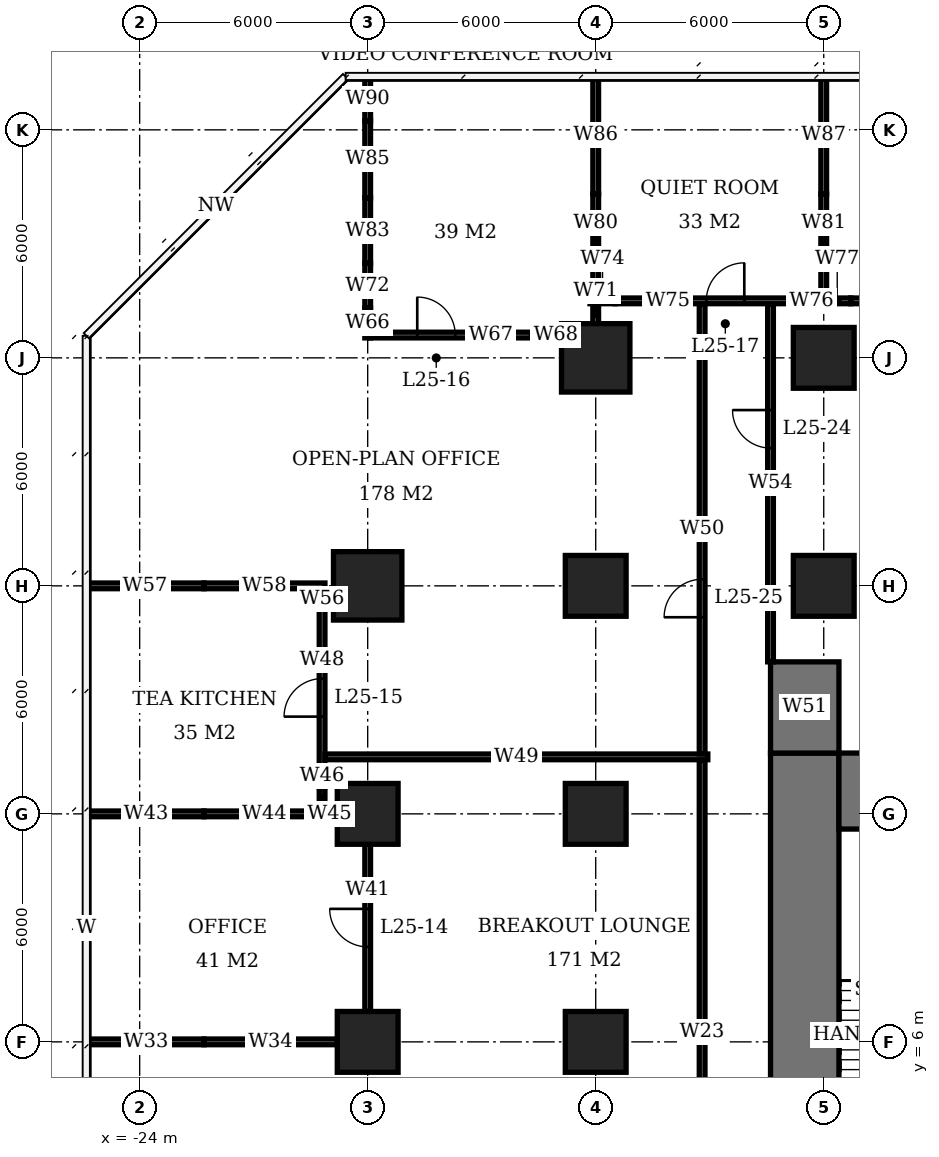
"""IFC4 building model, lengths in metres.
Left out: names, types, materials, properties, quantities, classifications, styles, units other than length and angle.
Written with IfcOpenShell. Run it as: python <this file> out.ifc"""

import sys

from ifc_helpers import new_model, si_unit, direction, frame, frame_2d, origin, origin_2d, place, context, subcontext, project, spatial, rectangle, extrude, element, fill, save


model = new_model("IFC4")
c1 = context("Model", 3, precision=1e-05, world=origin(), true_north=direction((0.0, 1.0)))
c2 = subcontext(c1, "Body", "Model", "MODEL_VIEW")
j1 = project(units=[si_unit("LENGTHUNIT", "METRE"), si_unit("PLANEANGLEUNIT", "RADIAN")], contexts=[c1])
p1 = place(None, origin())
s1 = spatial("IfcSite", under=j1, at=p1, CompositionType="ELEMENT")
p2 = place(p1, origin())
s2 = spatial("IfcBuilding", under=s1, at=p2, CompositionType="ELEMENT")
p3 = place(p2, frame((0.0, 0.0, 105.5)))
s3 = spatial("IfcBuildingStorey", under=s2, at=p3, CompositionType="ELEMENT", Elevation=105.5)
for number, where, z_axis, x_axis in (
    (1, (-18.0, 6.0, 0.0), (0.0, 0.0, 1.0), (1.0, 0.0, 0.0)),
    (2, (-18.0, 12.0, 0.0), (0.0, 0.0, 1.0), (1.0, 0.0, 0.0)),
):
    element("IfcColumn", number, at=place(p3, frame(where, z_axis=z_axis, x_axis=x_axis)), inside=s3, PredefinedType="COLUMN", context=c2, shape_type="SweptSolid", body=[
        extrude(rectangle(XDim=1.6, YDim=1.6, at=origin_2d()), origin(), (0.0, 0.0, 1.0), 3.9),
    ])
p4 = place(p3, frame((-18.0, 18.0, 0.0), z_axis=(0.0, 0.0, 1.0), x_axis=(1.0, 0.0, 0.0)))
e3 = element("IfcColumn", 3, at=p4, inside=s3, PredefinedType="COLUMN", context=c2, shape_type="SweptSolid", body=[
    extrude(rectangle(XDim=1.8, YDim=1.8, at=origin_2d()), origin(), (0.0, 0.0, 1.0), 3.9),
])
for number, where, z_axis, x_axis in (
    (4, (-12.0, 6.0, 0.0), (0.0, 0.0, 1.0), (1.0, 0.0, 0.0)),
    (5, (-12.0, 12.0, 0.0), (0.0, 0.0, 1.0), (1.0, 0.0, 0.0)),
    (6, (-12.0, 18.0, 0.0), (0.0, 0.0, 1.0), (1.0, 0.0, 0.0)),
):
    element("IfcColumn", number, at=place(p3, frame(where, z_axis=z_axis, x_axis=x_axis)), inside=s3, PredefinedType="COLUMN", context=c2, shape_type="SweptSolid", body=[
        extrude(rectangle(XDim=1.6, YDim=1.6, at=origin_2d()), origin(), (0.0, 0.0, 1.0), 3.9),
    ])
p5 = place(p3, frame((-12.0, 24.0, 0.0), z_axis=(0.0, 0.0, 1.0), x_axis=(1.0, 0.0, 0.0)))
e7 = element("IfcColumn", 7, at=p5, inside=s3, PredefinedType="COLUMN", context=c2, shape_type="SweptSolid", body=[
    extrude(rectangle(XDim=1.8, YDim=1.8, at=origin_2d()), origin(), (0.0, 0.0, 1.0), 3.9),
])
for number, where, z_axis, x_axis in (
    (8, (-6.0, 18.0, 0.0), (0.0, 0.0, 1.0), (1.0, 0.0, 0.0)),
    (9, (-6.0, 24.0, 0.0), (0.0, 0.0, 1.0), (1.0, 0.0, 0.0)),
):
    element("IfcColumn", number, at=place(p3, frame(where, z_axis=z_axis, x_axis=x_axis)), inside=s3, PredefinedType="COLUMN", context=c2, shape_type="SweptSolid", body=[
        extrude(rectangle(XDim=1.6, YDim=1.6, at=origin_2d()), origin(), (0.0, 0.0, 1.0), 3.9),
    ])
p6 = place(p3, frame((-5.6, 12.6, 0.0), z_axis=(0.0, 0.0, 1.0), x_axis=(1.0, 0.0, 0.0)))
e10 = element("IfcWall", 10, at=p6, inside=s3, PredefinedType="SHEAR", context=c2, shape_type="SweptSolid", body=[
    extrude(rectangle(XDim=23.2, YDim=2.0, at=frame_2d((11.6, 0.0))), origin(), (0.0, 0.0, 1.0), 3.9),
])
p7 = place(p3, frame((-6.5, -7.6, 0.0), z_axis=(0.0, 0.0, 1.0), x_axis=(0.0, 1.0, 0.0)))
e11 = element("IfcWall", 11, at=p7, inside=s3, PredefinedType="SHEAR", context=c2, shape_type="SweptSolid", body=[
    extrude(rectangle(XDim=21.2, YDim=1.8, at=frame_2d((10.6, 0.0))), origin(), (0.0, 0.0, 1.0), 3.9),
])
p8 = place(p7, frame((7.8, 0.0, 0.0)))
e12 = element("IfcOpeningElement", 12, at=p8, cuts=e11, PredefinedType="OPENING", context=c2, shape_type="SweptSolid", body=[
    extrude(rectangle(XDim=1.8, YDim=2.4, at=frame_2d((0.9, 1.2))), frame((0.0, 0.91, 0.0), z_axis=(0.0, -1.0, 0.0), x_axis=(1.0, 0.0, 0.0)), (0.0, 0.0, 1.0), 1.82),
])
p9 = place(p3, frame((-6.5, 13.6, 0.0), z_axis=(0.0, 0.0, 1.0), x_axis=(0.0, 1.0, 0.0)))
e13 = element("IfcWall", 13, at=p9, inside=s3, PredefinedType="SHEAR", context=c2, shape_type="SweptSolid", body=[
    extrude(rectangle(XDim=2.4, YDim=1.8, at=frame_2d((1.2, 0.0))), origin(), (0.0, 0.0, 1.0), 3.9),
])
p10 = place(p3, frame((-25.35, 6.0, 0.0), z_axis=(0.0, 0.0, 1.0), x_axis=(1.0, 0.0, 0.0)))
e14 = element("IfcWall", 14, at=p10, inside=s3, PredefinedType="PARTITIONING", context=c2, shape_type="SweptSolid", body=[
    extrude(rectangle(XDim=3.04, YDim=0.15, at=frame_2d((1.52, 0.0))), origin(), (0.0, 0.0, 1.0), 3.65),
])
p11 = place(p3, frame((-22.31, 6.0, 0.0), z_axis=(0.0, 0.0, 1.0), x_axis=(1.0, 0.0, 0.0)))
e15 = element("IfcWall", 15, at=p11, inside=s3, PredefinedType="PARTITIONING", context=c2, shape_type="SweptSolid", body=[
    extrude(rectangle(XDim=3.51, YDim=0.15, at=frame_2d((1.755, 0.0))), origin(), (0.0, 0.0, 1.0), 2.65),
])
p12 = place(p3, frame((-25.35, 12.0, 0.0), z_axis=(0.0, 0.0, 1.0), x_axis=(1.0, 0.0, 0.0)))
e16 = element("IfcWall", 16, at=p12, inside=s3, PredefinedType="PARTITIONING", context=c2, shape_type="SweptSolid", body=[
    extrude(rectangle(XDim=3.04, YDim=0.15, at=frame_2d((1.52, 0.0))), origin(), (0.0, 0.0, 1.0), 3.65),
])
p13 = place(p3, frame((-22.31, 12.0, 0.0), z_axis=(0.0, 0.0, 1.0), x_axis=(1.0, 0.0, 0.0)))
e17 = element("IfcWall", 17, at=p13, inside=s3, PredefinedType="PARTITIONING", context=c2, shape_type="SweptSolid", body=[
    extrude(rectangle(XDim=3.185, YDim=0.15, at=frame_2d((1.593, 0.0))), origin(), (0.0, 0.0, 1.0), 2.65),
])
p14 = place(p3, frame((-19.2, 12.0, 0.0), z_axis=(0.0, 0.0, 1.0), x_axis=(1.0, 0.0, 0.0)))
e18 = element("IfcWall", 18, at=p14, inside=s3, PredefinedType="PARTITIONING", context=c2, shape_type="SweptSolid", body=[
    extrude(rectangle(XDim=0.4, YDim=0.15, at=frame_2d((0.2, 0.0))), origin(), (0.0, 0.0, 1.0), 2.65),
])
p15 = place(p3, frame((-25.4, 18.0, 0.0), z_axis=(0.0, 0.0, 1.0), x_axis=(1.0, 0.0, 0.0)))
e19 = element("IfcWall", 19, at=p15, inside=s3, PredefinedType="PARTITIONING", context=c2, shape_type="SweptSolid", body=[
    extrude(rectangle(XDim=3.09, YDim=0.15, at=frame_2d((1.545, 0.0))), origin(), (0.0, 0.0, 1.0), 3.65),
])
p16 = place(p3, frame((-22.31, 18.0, 0.0), z_axis=(0.0, 0.0, 1.0), x_axis=(1.0, 0.0, 0.0)))
e20 = element("IfcWall", 20, at=p16, inside=s3, PredefinedType="PARTITIONING", context=c2, shape_type="SweptSolid", body=[
    extrude(rectangle(XDim=3.185, YDim=0.15, at=frame_2d((1.593, 0.0))), origin(), (0.0, 0.0, 1.0), 2.65),
])
p17 = place(p3, frame((-17.925, 24.6, 0.0), z_axis=(0.0, 0.0, 1.0), x_axis=(1.0, 0.0, 0.0)))
e21 = element("IfcWall", 21, at=p17, inside=s3, PredefinedType="PARTITIONING", context=c2, shape_type="SweptSolid", body=[
    extrude(rectangle(XDim=3.533, YDim=0.15, at=frame_2d((1.767, 0.0))), origin(), (0.0, 0.0, 1.0), 3.65),
])
p18 = place(p17, frame((1.229, 0.0, 0.0)))
e22 = element("IfcOpeningElement", 22, at=p18, cuts=e21, PredefinedType="OPENING", context=c2, shape_type="SweptSolid", body=[
    extrude(rectangle(XDim=1.0, YDim=2.1, at=frame_2d((0.5, 1.05))), frame((0.0, 0.085, 0.0), z_axis=(0.0, -1.0, 0.0), x_axis=(1.0, 0.0, 0.0)), (0.0, 0.0, 1.0), 0.17),
])
p19 = place(p3, frame((-14.392, 24.6, 0.0), z_axis=(0.0, 0.0, 1.0), x_axis=(1.0, 0.0, 0.0)))
e23 = element("IfcWall", 23, at=p19, inside=s3, PredefinedType="PARTITIONING", context=c2, shape_type="SweptSolid", body=[
    extrude(rectangle(XDim=1.492, YDim=0.15, at=frame_2d((0.746, 0.0))), origin(), (0.0, 0.0, 1.0), 2.65),
])
p20 = place(p3, frame((-12.15, 25.5, 0.0), z_axis=(0.0, 0.0, 1.0), x_axis=(1.0, 0.0, 0.0)))
e24 = element("IfcWall", 24, at=p20, inside=s3, PredefinedType="PARTITIONING", context=c2, shape_type="SweptSolid", body=[
    extrude(rectangle(XDim=0.66, YDim=0.15, at=frame_2d((0.33, 0.0))), origin(), (0.0, 0.0, 1.0), 2.65),
])
p21 = place(p3, frame((-11.49, 25.5, 0.0), z_axis=(0.0, 0.0, 1.0), x_axis=(1.0, 0.0, 0.0)))
e25 = element("IfcWall", 25, at=p21, inside=s3, PredefinedType="PARTITIONING", context=c2, shape_type="SweptSolid", body=[
    extrude(rectangle(XDim=4.78, YDim=0.15, at=frame_2d((2.39, 0.0))), origin(), (0.0, 0.0, 1.0), 3.65),
])
p22 = place(p21, frame((2.4, 0.0, 0.0)))
e26 = element("IfcOpeningElement", 26, at=p22, cuts=e25, PredefinedType="OPENING", context=c2, shape_type="SweptSolid", body=[
    extrude(rectangle(XDim=1.0, YDim=2.1, at=frame_2d((0.5, 1.05))), frame((0.0, 0.085, 0.0), z_axis=(0.0, -1.0, 0.0), x_axis=(1.0, 0.0, 0.0)), (0.0, 0.0, 1.0), 0.17),
])
p23 = place(p3, frame((-6.71, 25.5, 0.0), z_axis=(0.0, 0.0, 1.0), x_axis=(1.0, 0.0, 0.0)))
e27 = element("IfcWall", 27, at=p23, inside=s3, PredefinedType="PARTITIONING", context=c2, shape_type="SweptSolid", body=[
    extrude(rectangle(XDim=0.785, YDim=0.15, at=frame_2d((0.393, 0.0))), origin(), (0.0, 0.0, 1.0), 2.65),
])
p24 = place(p3, frame((-6.0, 25.5, 0.0), z_axis=(0.0, 0.0, 1.0), x_axis=(1.0, 0.0, 0.0)))
e28 = element("IfcWall", 28, at=p24, inside=s3, PredefinedType="PARTITIONING", context=c2, shape_type="SweptSolid", body=[
    extrude(rectangle(XDim=0.71, YDim=0.15, at=frame_2d((0.355, 0.0))), origin(), (0.0, 0.0, 1.0), 2.65),
])
p25 = place(p3, frame((-5.29, 25.5, 0.0), z_axis=(0.0, 0.0, 1.0), x_axis=(1.0, 0.0, 0.0)))
e29 = element("IfcWall", 29, at=p25, inside=s3, PredefinedType="PARTITIONING", context=c2, shape_type="SweptSolid", body=[
    extrude(rectangle(XDim=4.58, YDim=0.15, at=frame_2d((2.29, 0.0))), origin(), (0.0, 0.0, 1.0), 3.65),
])
p26 = place(p25, frame((1.79, 0.0, 0.0)))
e30 = element("IfcOpeningElement", 30, at=p26, cuts=e29, PredefinedType="OPENING", context=c2, shape_type="SweptSolid", body=[
    extrude(rectangle(XDim=1.0, YDim=2.1, at=frame_2d((0.5, 1.05))), frame((0.0, 0.085, 0.0), z_axis=(0.0, -1.0, 0.0), x_axis=(1.0, 0.0, 0.0)), (0.0, 0.0, 1.0), 0.17),
])
p27 = place(p3, frame((-19.2, 12.075, 0.0), z_axis=(0.0, 0.0, 1.0), x_axis=(0.0, 1.0, 0.0)))
e31 = element("IfcWall", 31, at=p27, inside=s3, PredefinedType="PARTITIONING", context=c2, shape_type="SweptSolid", body=[
    extrude(rectangle(XDim=0.635, YDim=0.15, at=frame_2d((0.317, 0.0))), origin(), (0.0, 0.0, 1.0), 2.65),
])
p28 = place(p3, frame((-19.2, 12.71, 0.0), z_axis=(0.0, 0.0, 1.0), x_axis=(0.0, 1.0, 0.0)))
e32 = element("IfcWall", 32, at=p28, inside=s3, PredefinedType="PARTITIONING", context=c2, shape_type="SweptSolid", body=[
    extrude(rectangle(XDim=4.698, YDim=0.15, at=frame_2d((2.349, 0.0))), origin(), (0.0, 0.0, 1.0), 3.65),
])
p29 = place(p28, frame((1.849, 0.0, 0.0)))
e33 = element("IfcOpeningElement", 33, at=p29, cuts=e32, PredefinedType="OPENING", context=c2, shape_type="SweptSolid", body=[
    extrude(rectangle(XDim=1.0, YDim=2.1, at=frame_2d((0.5, 1.05))), frame((0.0, 0.085, 0.0), z_axis=(0.0, -1.0, 0.0), x_axis=(1.0, 0.0, 0.0)), (0.0, 0.0, 1.0), 0.17),
])
p30 = place(p3, frame((-19.2, 17.408, 0.0), z_axis=(0.0, 0.0, 1.0), x_axis=(0.0, 1.0, 0.0)))
e34 = element("IfcWall", 34, at=p30, inside=s3, PredefinedType="PARTITIONING", context=c2, shape_type="SweptSolid", body=[
    extrude(rectangle(XDim=0.517, YDim=0.15, at=frame_2d((0.259, 0.0))), origin(), (0.0, 0.0, 1.0), 2.65),
])
p31 = place(p3, frame((-18.0, 6.8, 0.0), z_axis=(0.0, 0.0, 1.0), x_axis=(0.0, 1.0, 0.0)))
e35 = element("IfcWall", 35, at=p31, inside=s3, PredefinedType="PARTITIONING", context=c2, shape_type="SweptSolid", body=[
    extrude(rectangle(XDim=4.4, YDim=0.15, at=frame_2d((2.2, 0.0))), origin(), (0.0, 0.0, 1.0), 3.65),
])
p32 = place(p31, frame((1.7, 0.0, 0.0)))
e36 = element("IfcOpeningElement", 36, at=p32, cuts=e35, PredefinedType="OPENING", context=c2, shape_type="SweptSolid", body=[
    extrude(rectangle(XDim=1.0, YDim=2.1, at=frame_2d((0.5, 1.05))), frame((0.0, 0.085, 0.0), z_axis=(0.0, -1.0, 0.0), x_axis=(1.0, 0.0, 0.0)), (0.0, 0.0, 1.0), 0.17),
])
p33 = place(p3, frame((-18.0, 24.525, 0.0), z_axis=(0.0, 0.0, 1.0), x_axis=(0.0, 1.0, 0.0)))
e37 = element("IfcWall", 37, at=p33, inside=s3, PredefinedType="PARTITIONING", context=c2, shape_type="SweptSolid", body=[
    extrude(rectangle(XDim=0.785, YDim=0.15, at=frame_2d((0.393, 0.0))), origin(), (0.0, 0.0, 1.0), 3.65),
])
p34 = place(p3, frame((-18.0, 25.31, 0.0), z_axis=(0.0, 0.0, 1.0), x_axis=(0.0, 1.0, 0.0)))
e38 = element("IfcWall", 38, at=p34, inside=s3, PredefinedType="PARTITIONING", context=c2, shape_type="SweptSolid", body=[
    extrude(rectangle(XDim=1.18, YDim=0.15, at=frame_2d((0.59, 0.0))), origin(), (0.0, 0.0, 1.0), 2.65),
])
p35 = place(p3, frame((-18.0, 26.49, 0.0), z_axis=(0.0, 0.0, 1.0), x_axis=(0.0, 1.0, 0.0)))
e39 = element("IfcWall", 39, at=p35, inside=s3, PredefinedType="PARTITIONING", context=c2, shape_type="SweptSolid", body=[
    extrude(rectangle(XDim=1.718, YDim=0.15, at=frame_2d((0.859, 0.0))), origin(), (0.0, 0.0, 1.0), 3.65),
])
p36 = place(p3, frame((-18.0, 28.208, 0.0), z_axis=(0.0, 0.0, 1.0), x_axis=(0.0, 1.0, 0.0)))
e40 = element("IfcWall", 40, at=p36, inside=s3, PredefinedType="PARTITIONING", context=c2, shape_type="SweptSolid", body=[
    extrude(rectangle(XDim=2.029, YDim=0.15, at=frame_2d((1.015, 0.0))), origin(), (0.0, 0.0, 1.0), 2.65),
])
p37 = place(p3, frame((-18.0, 30.237, 0.0), z_axis=(0.0, 0.0, 1.0), x_axis=(0.0, 1.0, 0.0)))
e41 = element("IfcWall", 41, at=p37, inside=s3, PredefinedType="PARTITIONING", context=c2, shape_type="SweptSolid", body=[
    extrude(rectangle(XDim=1.163, YDim=0.15, at=frame_2d((0.582, 0.0))), origin(), (0.0, 0.0, 1.0), 3.65),
])
p38 = place(p3, frame((-12.0, 24.9, 0.0), z_axis=(0.0, 0.0, 1.0), x_axis=(0.0, 1.0, 0.0)))
e42 = element("IfcWall", 42, at=p38, inside=s3, PredefinedType="PARTITIONING", context=c2, shape_type="SweptSolid", body=[
    extrude(rectangle(XDim=0.525, YDim=0.15, at=frame_2d((0.263, 0.0))), origin(), (0.0, 0.0, 1.0), 2.65),
])
p39 = place(p3, frame((-12.0, 25.575, 0.0), z_axis=(0.0, 0.0, 1.0), x_axis=(0.0, 1.0, 0.0)))
e43 = element("IfcWall", 43, at=p39, inside=s3, PredefinedType="PARTITIONING", context=c2, shape_type="SweptSolid", body=[
    extrude(rectangle(XDim=2.735, YDim=0.15, at=frame_2d((1.368, 0.0))), origin(), (0.0, 0.0, 1.0), 2.65),
])
p40 = place(p3, frame((-12.0, 28.31, 0.0), z_axis=(0.0, 0.0, 1.0), x_axis=(0.0, 1.0, 0.0)))
e44 = element("IfcWall", 44, at=p40, inside=s3, PredefinedType="PARTITIONING", context=c2, shape_type="SweptSolid", body=[
    extrude(rectangle(XDim=3.09, YDim=0.15, at=frame_2d((1.545, 0.0))), origin(), (0.0, 0.0, 1.0), 3.65),
])
p41 = place(p3, frame((-6.0, 25.575, 0.0), z_axis=(0.0, 0.0, 1.0), x_axis=(0.0, 1.0, 0.0)))
e45 = element("IfcWall", 45, at=p41, inside=s3, PredefinedType="PARTITIONING", context=c2, shape_type="SweptSolid", body=[
    extrude(rectangle(XDim=2.735, YDim=0.15, at=frame_2d((1.368, 0.0))), origin(), (0.0, 0.0, 1.0), 2.65),
])
p42 = place(p3, frame((-6.0, 28.31, 0.0), z_axis=(0.0, 0.0, 1.0), x_axis=(0.0, 1.0, 0.0)))
e46 = element("IfcWall", 46, at=p42, inside=s3, PredefinedType="PARTITIONING", context=c2, shape_type="SweptSolid", body=[
    extrude(rectangle(XDim=3.09, YDim=0.15, at=frame_2d((1.545, 0.0))), origin(), (0.0, 0.0, 1.0), 3.65),
])
p43 = place(p3, frame((-19.125, 13.5, 0.0), z_axis=(0.0, 0.0, 1.0), x_axis=(1.0, 0.0, 0.0)))
e47 = element("IfcWall", 47, at=p43, inside=s3, PredefinedType="PARTITIONING", context=c2, shape_type="SweptSolid", body=[
    extrude(rectangle(XDim=10.075, YDim=0.15, at=frame_2d((5.038, 0.0))), origin(), (0.0, 0.0, 1.0), 3.65),
])
p44 = place(p3, frame((-9.2, -0.9, 0.0), z_axis=(0.0, 0.0, 1.0), x_axis=(0.0, 1.0, 0.0)))
e48 = element("IfcWall", 48, at=p44, inside=s3, PredefinedType="PARTITIONING", context=c2, shape_type="SweptSolid", body=[
    extrude(rectangle(XDim=14.325, YDim=0.15, at=frame_2d((7.163, 0.0))), origin(), (0.0, 0.0, 1.0), 3.65),
])
p45 = place(p44, frame((4.491, 0.0, 0.0)))
e49 = element("IfcOpeningElement", 49, at=p45, cuts=e48, PredefinedType="OPENING", context=c2, shape_type="SweptSolid", body=[
    extrude(rectangle(XDim=1.0, YDim=2.1, at=frame_2d((0.5, 1.05))), frame((0.0, 0.085, 0.0), z_axis=(0.0, -1.0, 0.0), x_axis=(1.0, 0.0, 0.0)), (0.0, 0.0, 1.0), 0.17),
])
p46 = place(p3, frame((-9.2, 13.575, 0.0), z_axis=(0.0, 0.0, 1.0), x_axis=(0.0, 1.0, 0.0)))
e50 = element("IfcWall", 50, at=p46, inside=s3, PredefinedType="PARTITIONING", context=c2, shape_type="SweptSolid", body=[
    extrude(rectangle(XDim=11.85, YDim=0.15, at=frame_2d((5.925, 0.0))), origin(), (0.0, 0.0, 1.0), 3.65),
])
p47 = place(p46, frame((3.599, 0.0, 0.0)))
e51 = element("IfcOpeningElement", 51, at=p47, cuts=e50, PredefinedType="OPENING", context=c2, shape_type="SweptSolid", body=[
    extrude(rectangle(XDim=1.0, YDim=2.1, at=frame_2d((0.5, 1.05))), frame((0.0, 0.085, 0.0), z_axis=(0.0, -1.0, 0.0), x_axis=(1.0, 0.0, 0.0)), (0.0, 0.0, 1.0), 0.17),
])
p48 = place(p3, frame((-7.4, 16.0, 0.0), z_axis=(0.0, 0.0, 1.0), x_axis=(0.0, 1.0, 0.0)))
e52 = element("IfcWall", 52, at=p48, inside=s3, PredefinedType="PARTITIONING", context=c2, shape_type="SweptSolid", body=[
    extrude(rectangle(XDim=9.425, YDim=0.15, at=frame_2d((4.712, 0.0))), origin(), (0.0, 0.0, 1.0), 3.65),
])
p49 = place(p48, frame((5.626, 0.0, 0.0)))
e53 = element("IfcOpeningElement", 53, at=p49, cuts=e52, PredefinedType="OPENING", context=c2, shape_type="SweptSolid", body=[
    extrude(rectangle(XDim=1.0, YDim=2.1, at=frame_2d((0.5, 1.05))), frame((0.0, 0.085, 0.0), z_axis=(0.0, -1.0, 0.0), x_axis=(1.0, 0.0, 0.0)), (0.0, 0.0, 1.0), 0.17),
])
p50 = place(p32, origin())
e54 = element("IfcDoor", 54, at=p50, inside=s3, OperationType="SINGLE_SWING_RIGHT", PredefinedType="DOOR", context=c2, shape_type="SweptSolid", body=[
    extrude(rectangle(XDim=1.0, YDim=2.1, at=frame_2d((0.5, 1.05))), frame((0.0, 0.025, 0.0), z_axis=(0.0, -1.0, 0.0), x_axis=(1.0, 0.0, 0.0)), (0.0, 0.0, 1.0), 0.05),
])
fill(e36, e54)
p51 = place(p29, origin())
e55 = element("IfcDoor", 55, at=p51, inside=s3, OperationType="SINGLE_SWING_LEFT", PredefinedType="DOOR", context=c2, shape_type="SweptSolid", body=[
    extrude(rectangle(XDim=1.0, YDim=2.1, at=frame_2d((0.5, 1.05))), frame((0.0, 0.025, 0.0), z_axis=(0.0, -1.0, 0.0), x_axis=(1.0, 0.0, 0.0)), (0.0, 0.0, 1.0), 0.05),
])
fill(e33, e55)
p52 = place(p18, origin())
e56 = element("IfcDoor", 56, at=p52, inside=s3, OperationType="SINGLE_SWING_LEFT", PredefinedType="DOOR", context=c2, shape_type="SweptSolid", body=[
    extrude(rectangle(XDim=1.0, YDim=2.1, at=frame_2d((0.5, 1.05))), frame((0.0, 0.025, 0.0), z_axis=(0.0, -1.0, 0.0), x_axis=(1.0, 0.0, 0.0)), (0.0, 0.0, 1.0), 0.05),
])
fill(e22, e56)
p53 = place(p22, origin())
e57 = element("IfcDoor", 57, at=p53, inside=s3, OperationType="SINGLE_SWING_RIGHT", PredefinedType="DOOR", context=c2, shape_type="SweptSolid", body=[
    extrude(rectangle(XDim=1.0, YDim=2.1, at=frame_2d((0.5, 1.05))), frame((0.0, 0.025, 0.0), z_axis=(0.0, -1.0, 0.0), x_axis=(1.0, 0.0, 0.0)), (0.0, 0.0, 1.0), 0.05),
])
fill(e26, e57)
p54 = place(p49, origin())
e58 = element("IfcDoor", 58, at=p54, inside=s3, OperationType="SINGLE_SWING_RIGHT", PredefinedType="DOOR", context=c2, shape_type="SweptSolid", body=[
    extrude(rectangle(XDim=1.0, YDim=2.1, at=frame_2d((0.5, 1.05))), frame((0.0, 0.025, 0.0), z_axis=(0.0, -1.0, 0.0), x_axis=(1.0, 0.0, 0.0)), (0.0, 0.0, 1.0), 0.05),
])
fill(e53, e58)
p55 = place(p47, origin())
e59 = element("IfcDoor", 59, at=p55, inside=s3, OperationType="SINGLE_SWING_LEFT", PredefinedType="DOOR", context=c2, shape_type="SweptSolid", body=[
    extrude(rectangle(XDim=1.0, YDim=2.1, at=frame_2d((0.5, 1.05))), frame((0.0, 0.025, 0.0), z_axis=(0.0, -1.0, 0.0), x_axis=(1.0, 0.0, 0.0)), (0.0, 0.0, 1.0), 0.05),
])
fill(e51, e59)
save(model, sys.argv[1])
